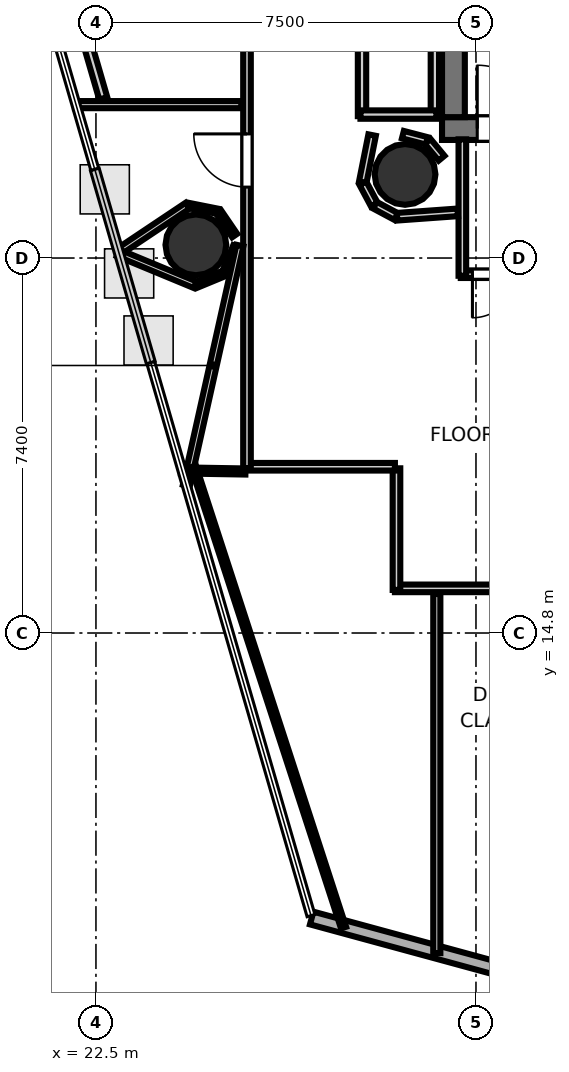
"""IFC4 building model, lengths in metres.
Left out: names, types, materials, properties, quantities, classifications, styles, units other than length and angle.
Written with IfcOpenShell. Run it as: python <this file> out.ifc"""

import sys

from ifc_helpers import new_model, si_unit, direction, frame, frame_2d, origin, origin_2d, place, context, subcontext, project, spatial, rectangle, hollow_circle, extrude, element, fill, save


model = new_model("IFC4")
c1 = context("Model", 3, precision=1e-05, world=origin(), true_north=direction((0.0, 1.0)))
c2 = subcontext(c1, "Body", "Model", "MODEL_VIEW")
j1 = project(units=[si_unit("LENGTHUNIT", "METRE"), si_unit("PLANEANGLEUNIT", "RADIAN")], contexts=[c1])
p1 = place(None, origin())
s1 = spatial("IfcSite", under=j1, at=p1, CompositionType="ELEMENT")
p2 = place(p1, origin())
s2 = spatial("IfcBuilding", under=s1, at=p2, CompositionType="ELEMENT")
p3 = place(p2, frame((0.0, 0.0, 215.1)))
s3 = spatial("IfcBuildingStorey", under=s2, at=p3, CompositionType="ELEMENT", Elevation=215.1)
p4 = place(p3, frame((29.33, 24.755, 0.0), z_axis=(0.0, 0.0, 1.0), x_axis=(1.0, 0.0, 0.0)))
e1 = element("IfcWall", 1, at=p4, inside=s3, PredefinedType="SHEAR", context=c2, shape_type="SweptSolid", body=[
    extrude(rectangle(XDim=10.52, YDim=0.45, at=frame_2d((5.26, 0.0))), origin(), (0.0, 0.0, 1.0), 3.52),
])
p5 = place(p4, frame((0.695, 0.0, 0.0)))
e2 = element("IfcOpeningElement", 2, at=p5, cuts=e1, PredefinedType="OPENING", context=c2, shape_type="SweptSolid", body=[
    extrude(rectangle(XDim=1.25, YDim=2.15, at=frame_2d((0.625, 1.075))), frame((0.0, 0.235, 0.0), z_axis=(0.0, -1.0, 0.0), x_axis=(1.0, 0.0, 0.0)), (0.0, 0.0, 1.0), 0.47),
])
p6 = place(p3, frame((29.555, 24.98, 0.0), z_axis=(0.0, 0.0, 1.0), x_axis=(0.0, 1.0, 0.0)))
e3 = element("IfcWall", 3, at=p6, inside=s3, PredefinedType="SHEAR", context=c2, shape_type="SweptSolid", body=[
    extrude(rectangle(XDim=7.44, YDim=0.45, at=frame_2d((3.72, 0.0))), origin(), (0.0, 0.0, 1.0), 3.52),
])
for number, where, z_axis, x_axis in (
    (4, (28.6, 23.85, 0.0), (0.0, 0.0, 1.0), (1.0, 0.0, 0.0)),
    (5, (24.472, 22.46, 0.0), (0.0, 0.0, 1.0), (1.0, 0.0, 0.0)),
):
    element("IfcColumn", number, at=place(p3, frame(where, z_axis=z_axis, x_axis=x_axis)), inside=s3, PredefinedType="COLUMN", context=c2, shape_type="SweptSolid", body=[
        extrude(hollow_circle(Radius=0.6, WallThickness=0.03, at=origin_2d()), origin(), (0.0, 0.0, 1.0), 3.7),
    ])
p7 = place(p3, frame((26.758, 9.175, 0.0), z_axis=(0.0, 0.0, 1.0), x_axis=(0.964898373598, -0.262623549265, 0.0)))
e6 = element("IfcWall", 6, at=p7, inside=s3, PredefinedType="SOLIDWALL", context=c2, shape_type="SweptSolid", body=[
    extrude(rectangle(XDim=7.028, YDim=0.26, at=frame_2d((3.514, 0.0))), origin(), (0.0, 0.0, 1.0), 3.52),
])
p8 = place(p7, frame((4.32, 0.0, 0.9)))
e7 = element("IfcOpeningElement", 7, at=p8, cuts=e6, PredefinedType="OPENING", context=c2, shape_type="SweptSolid", body=[
    extrude(rectangle(XDim=1.2, YDim=2.0, at=frame_2d((0.6, 1.0))), frame((0.0, 0.14, 0.0), z_axis=(0.0, -1.0, 0.0), x_axis=(1.0, 0.0, 0.0)), (0.0, 0.0, 1.0), 0.28),
])
p9 = place(p3, frame((33.45, 21.881, 0.0), z_axis=(0.0, 0.0, 1.0), x_axis=(-1.0, 0.0, 0.0)))
e8 = element("IfcWall", 8, at=p9, inside=s3, PredefinedType="PARTITIONING", context=c2, shape_type="SweptSolid", body=[
    extrude(rectangle(XDim=3.75, YDim=0.15, at=frame_2d((1.875, 0.0))), origin(), (0.0, 0.0, 1.0), 2.84),
])
p10 = place(p9, frame((1.275, 0.0, 0.0)))
e9 = element("IfcOpeningElement", 9, at=p10, cuts=e8, PredefinedType="OPENING", context=c2, shape_type="SweptSolid", body=[
    extrude(rectangle(XDim=1.2, YDim=2.15, at=frame_2d((0.6, 1.075))), frame((0.0, 0.085, 0.0), z_axis=(0.0, -1.0, 0.0), x_axis=(1.0, 0.0, 0.0)), (0.0, 0.0, 1.0), 0.17),
])
p11 = place(p9, frame((2.66, 0.0, 0.0)))
e10 = element("IfcOpeningElement", 10, at=p11, cuts=e8, PredefinedType="OPENING", context=c2, shape_type="SweptSolid", body=[
    extrude(rectangle(XDim=0.86, YDim=2.05, at=frame_2d((0.43, 1.025))), frame((0.0, 0.085, 0.0), z_axis=(0.0, -1.0, 0.0), x_axis=(1.0, 0.0, 0.0)), (0.0, 0.0, 1.0), 0.17),
])
p12 = place(p3, frame((29.731, 21.85, 0.0), z_axis=(0.0, 0.0, 1.0), x_axis=(0.0, 1.0, 0.0)))
e11 = element("IfcWall", 11, at=p12, inside=s3, PredefinedType="PARTITIONING", context=c2, shape_type="SweptSolid", body=[
    extrude(rectangle(XDim=2.692, YDim=0.15, at=frame_2d((1.346, 0.0))), origin(), (0.0, 0.0, 1.0), 2.84),
])
p13 = place(p3, frame((27.751, 25.0, 0.0), z_axis=(0.0, 0.0, 1.0), x_axis=(0.0, 1.0, 0.0)))
e12 = element("IfcWall", 12, at=p13, inside=s3, PredefinedType="PLUMBINGWALL", context=c2, shape_type="SweptSolid", body=[
    extrude(rectangle(XDim=4.12, YDim=0.165, at=frame_2d((2.06, 0.0))), origin(), (0.0, 0.0, 1.0), 2.84),
])
p14 = place(p13, frame((1.61, 0.0, 0.0)))
e13 = element("IfcOpeningElement", 13, at=p14, cuts=e12, PredefinedType="OPENING", context=c2, shape_type="SweptSolid", body=[
    extrude(rectangle(XDim=0.9, YDim=2.1, at=frame_2d((0.45, 1.05))), frame((0.0, 0.093, 0.0), z_axis=(0.0, -1.0, 0.0), x_axis=(1.0, 0.0, 0.0)), (0.0, 0.0, 1.0), 0.185),
])
p15 = place(p3, frame((29.189, 29.12, 0.0), z_axis=(0.0, 0.0, 1.0), x_axis=(0.0, -1.0, 0.0)))
e14 = element("IfcWall", 14, at=p15, inside=s3, PredefinedType="PLUMBINGWALL", context=c2, shape_type="SweptSolid", body=[
    extrude(rectangle(XDim=4.12, YDim=0.165, at=frame_2d((2.06, 0.0))), origin(), (0.0, 0.0, 1.0), 2.84),
])
p16 = place(p3, frame((29.22, 25.031, 0.0), z_axis=(0.0, 0.0, 1.0), x_axis=(-1.0, 0.0, 0.0)))
e15 = element("IfcWall", 15, at=p16, inside=s3, PredefinedType="PLUMBINGWALL", context=c2, shape_type="SweptSolid", body=[
    extrude(rectangle(XDim=1.5, YDim=0.165, at=frame_2d((0.75, 0.0))), origin(), (0.0, 0.0, 1.0), 2.84),
])
p17 = place(p3, frame((29.321, 24.17, 0.0), z_axis=(0.0, 0.0, 1.0), x_axis=(-0.638008265708, 0.770029514296, 0.0)))
e16 = element("IfcWall", 16, at=p17, inside=s3, PredefinedType="PARTITIONING", context=c2, shape_type="SweptSolid", body=[
    extrude(rectangle(XDim=0.431, YDim=0.15, at=frame_2d((0.215, 0.0))), origin(), (0.0, 0.0, 1.0), 2.84),
])
p18 = place(p3, frame((29.03, 24.512, 0.0), z_axis=(0.0, 0.0, 1.0), x_axis=(-0.967681003213, 0.252177469296, 0.0)))
e17 = element("IfcWall", 17, at=p18, inside=s3, PredefinedType="PARTITIONING", context=c2, shape_type="SweptSolid", body=[
    extrude(rectangle(XDim=0.488, YDim=0.15, at=frame_2d((0.244, 0.0))), origin(), (0.0, 0.0, 1.0), 2.84),
])
p19 = place(p3, frame((27.95, 24.626, 0.0), z_axis=(0.0, 0.0, 1.0), x_axis=(-0.195125950178, -0.980778192848, 0.0)))
e18 = element("IfcWall", 18, at=p19, inside=s3, PredefinedType="PARTITIONING", context=c2, shape_type="SweptSolid", body=[
    extrude(rectangle(XDim=0.948, YDim=0.15, at=frame_2d((0.474, 0.0))), origin(), (0.0, 0.0, 1.0), 2.84),
])
for number, where, z_axis, x_axis in (
    (19, (27.768, 23.675, 0.0), (0.0, 0.0, 1.0), (0.472, -0.882, 0.0)),
    (20, (28.006, 23.243, 0.0), (0.0, 0.0, 1.0), (0.882, -0.472, 0.0)),
):
    element("IfcWall", number, at=place(p3, frame(where, z_axis=z_axis, x_axis=x_axis)), inside=s3, PredefinedType="PARTITIONING", context=c2, shape_type="SweptSolid", body=[
        extrude(rectangle(XDim=0.476, YDim=0.15, at=frame_2d((0.238, 0.0))), origin(), (0.0, 0.0, 1.0), 2.84),
    ])
p20 = place(p3, frame((28.442, 23.015, 0.0), z_axis=(0.0, 0.0, 1.0), x_axis=(0.99740683837, 0.07196942943, 0.0)))
e21 = element("IfcWall", 21, at=p20, inside=s3, PredefinedType="PARTITIONING", context=c2, shape_type="SweptSolid", body=[
    extrude(rectangle(XDim=1.201, YDim=0.15, at=frame_2d((0.601, 0.0))), origin(), (0.0, 0.0, 1.0), 2.84),
])
p21 = place(p3, frame((43.333, 15.681, 0.0), z_axis=(0.0, 0.0, 1.0), x_axis=(-1.0, 0.0, 0.0)))
e22 = element("IfcWall", 22, at=p21, inside=s3, PredefinedType="PARTITIONING", context=c2, shape_type="SweptSolid", body=[
    extrude(rectangle(XDim=14.933, YDim=0.15, at=frame_2d((7.467, 0.0))), origin(), (0.0, 0.0, 1.0), 2.84),
])
p22 = place(p21, frame((6.846, 0.0, 0.0)))
e23 = element("IfcOpeningElement", 23, at=p22, cuts=e22, PredefinedType="OPENING", context=c2, shape_type="SweptSolid", body=[
    extrude(rectangle(XDim=1.25, YDim=2.2, at=frame_2d((0.625, 1.1))), frame((0.0, 0.085, 0.0), z_axis=(0.0, -1.0, 0.0), x_axis=(1.0, 0.0, 0.0)), (0.0, 0.0, 1.0), 0.17),
])
p23 = place(p3, frame((28.431, 15.65, 0.0), z_axis=(0.0, 0.0, 1.0), x_axis=(0.0, 1.0, 0.0)))
e24 = element("IfcWall", 24, at=p23, inside=s3, PredefinedType="PARTITIONING", context=c2, shape_type="SweptSolid", body=[
    extrude(rectangle(XDim=2.4, YDim=0.15, at=frame_2d((1.2, 0.0))), origin(), (0.0, 0.0, 1.0), 2.84),
])
p24 = place(p3, frame((28.4, 18.081, 0.0), z_axis=(0.0, 0.0, 1.0), x_axis=(-1.0, 0.0, 0.0)))
e25 = element("IfcWall", 25, at=p24, inside=s3, PredefinedType="PARTITIONING", context=c2, shape_type="SweptSolid", body=[
    extrude(rectangle(XDim=2.95, YDim=0.15, at=frame_2d((1.475, 0.0))), origin(), (0.0, 0.0, 1.0), 2.84),
])
p25 = place(p3, frame((25.481, 18.05, 0.0), z_axis=(0.0, 0.0, 1.0), x_axis=(0.0, 1.0, 0.0)))
e26 = element("IfcWall", 26, at=p25, inside=s3, PredefinedType="PARTITIONING", context=c2, shape_type="SweptSolid", body=[
    extrude(rectangle(XDim=18.219, YDim=0.15, at=frame_2d((9.109, 0.0))), origin(), (0.0, 0.0, 1.0), 2.84),
])
p26 = place(p25, frame((5.549, 0.0, 0.0)))
e27 = element("IfcOpeningElement", 27, at=p26, cuts=e26, PredefinedType="OPENING", context=c2, shape_type="SweptSolid", body=[
    extrude(rectangle(XDim=1.05, YDim=2.15, at=frame_2d((0.525, 1.075))), frame((0.0, 0.085, 0.0), z_axis=(0.0, -1.0, 0.0), x_axis=(1.0, 0.0, 0.0)), (0.0, 0.0, 1.0), 0.17),
])
p27 = place(p25, frame((15.285, 0.0, 0.0)))
e28 = element("IfcOpeningElement", 28, at=p27, cuts=e26, PredefinedType="OPENING", context=c2, shape_type="SweptSolid", body=[
    extrude(rectangle(XDim=0.9, YDim=2.1, at=frame_2d((0.45, 1.05))), frame((0.0, 0.085, 0.0), z_axis=(0.0, -1.0, 0.0), x_axis=(1.0, 0.0, 0.0)), (0.0, 0.0, 1.0), 0.17),
])
p28 = place(p25, frame((10.15, 0.0, 0.0)))
e29 = element("IfcOpeningElement", 29, at=p28, cuts=e26, PredefinedType="OPENING", context=c2, shape_type="SweptSolid", body=[
    extrude(rectangle(XDim=0.9, YDim=2.1, at=frame_2d((0.45, 1.05))), frame((0.0, 0.085, 0.0), z_axis=(0.0, -1.0, 0.0), x_axis=(1.0, 0.0, 0.0)), (0.0, 0.0, 1.0), 0.17),
])
p29 = place(p3, frame((25.238, 22.644, 0.0), z_axis=(0.0, 0.0, 1.0), x_axis=(-0.563363697458, 0.826209019792, 0.0)))
e30 = element("IfcWall", 30, at=p29, inside=s3, PredefinedType="PARTITIONING", context=c2, shape_type="SweptSolid", body=[
    extrude(rectangle(XDim=0.564, YDim=0.12, at=frame_2d((0.282, 0.0))), origin(), (0.0, 0.0, 1.0), 2.84),
])
p30 = place(p3, frame((24.9, 23.122, 0.0), z_axis=(0.0, 0.0, 1.0), x_axis=(-0.980773892286, 0.195147565217, 0.0)))
e31 = element("IfcWall", 31, at=p30, inside=s3, PredefinedType="PARTITIONING", context=c2, shape_type="SweptSolid", body=[
    extrude(rectangle(XDim=0.582, YDim=0.105, at=frame_2d((0.291, 0.0))), origin(), (0.0, 0.0, 1.0), 2.84),
])
p31 = place(p3, frame((24.306, 23.231, 0.0), z_axis=(0.0, 0.0, 1.0), x_axis=(-0.83134563291, -0.555755736489, 0.0)))
e32 = element("IfcWall", 32, at=p31, inside=s3, PredefinedType="PARTITIONING", context=c2, shape_type="SweptSolid", body=[
    extrude(rectangle(XDim=1.654, YDim=0.14, at=frame_2d((0.827, 0.0))), origin(), (0.0, 0.0, 1.0), 2.84),
])
p32 = place(p3, frame((22.938, 22.302, 0.0), z_axis=(0.0, 0.0, 1.0), x_axis=(0.923859705961, -0.382731294386, 0.0)))
e33 = element("IfcWall", 33, at=p32, inside=s3, PredefinedType="PARTITIONING", context=c2, shape_type="SweptSolid", body=[
    extrude(rectangle(XDim=1.648, YDim=0.14, at=frame_2d((0.824, 0.0))), origin(), (0.0, 0.0, 1.0), 2.84),
])
p33 = place(p3, frame((24.484, 21.671, 0.0), z_axis=(0.0, 0.0, 1.0), x_axis=(0.923832639322, 0.382796622927, 0.0)))
e34 = element("IfcWall", 34, at=p33, inside=s3, PredefinedType="PARTITIONING", context=c2, shape_type="SweptSolid", body=[
    extrude(rectangle(XDim=0.582, YDim=0.12, at=frame_2d((0.291, 0.0))), origin(), (0.0, 0.0, 1.0), 2.84),
])
p34 = place(p3, frame((25.038, 21.91, 0.0), z_axis=(0.0, 0.0, 1.0), x_axis=(0.389093528864, 0.921198255424, 0.0)))
e35 = element("IfcWall", 35, at=p34, inside=s3, PredefinedType="PARTITIONING", context=c2, shape_type="SweptSolid", body=[
    extrude(rectangle(XDim=0.568, YDim=0.105, at=frame_2d((0.284, 0.0))), origin(), (0.0, 0.0, 1.0), 2.84),
])
p35 = place(p3, frame((25.341, 22.446, 0.0), z_axis=(0.0, 0.0, 1.0), x_axis=(-0.217921517361, -0.975966296688, 0.0)))
e36 = element("IfcWall", 36, at=p35, inside=s3, PredefinedType="PARTITIONING", context=c2, shape_type="SweptSolid", body=[
    extrude(rectangle(XDim=4.851, YDim=0.14, at=frame_2d((2.426, 0.0))), origin(), (0.0, 0.0, 1.0), 2.84),
])
p36 = place(p3, frame((24.178, 18.009, 0.0), z_axis=(0.0, 0.0, 1.0), x_axis=(0.999860499529, -0.016702738759, 0.0)))
e37 = element("IfcWall", 37, at=p36, inside=s3, PredefinedType="PARTITIONING", context=c2, shape_type="SweptSolid", body=[
    extrude(rectangle(XDim=1.272, YDim=0.12, at=frame_2d((0.636, 0.0))), origin(), (0.0, 0.0, 1.0), 2.84),
])
p37 = place(p3, frame((29.227, 15.57, 0.0), z_axis=(0.0, 0.0, 1.0), x_axis=(0.0, -1.0, 0.0)))
e38 = element("IfcWall", 38, at=p37, inside=s3, PredefinedType="PARTITIONING", context=c2, shape_type="SweptSolid", body=[
    extrude(rectangle(XDim=7.087, YDim=0.14, at=frame_2d((3.543, 0.0))), origin(), (0.0, 0.0, 1.0), 2.84),
])
p38 = place(p3, frame((27.386, 8.987, 0.0), z_axis=(0.0, 0.0, 1.0), x_axis=(-0.309377923312, 0.950939167648, 0.0)))
e39 = element("IfcWall", 39, at=p38, inside=s3, PredefinedType="PARTITIONING", context=c2, shape_type="SweptSolid", body=[
    extrude(rectangle(XDim=9.571, YDim=0.105, at=frame_2d((4.785, 0.0))), origin(), (0.0, 0.0, 1.0), 2.84),
])
p39 = place(p3, frame((22.086, 25.227, 0.0), z_axis=(0.0, 0.0, 1.0), x_axis=(1.0, 0.0, 0.0)))
e40 = element("IfcWall", 40, at=p39, inside=s3, PredefinedType="PARTITIONING", context=c2, shape_type="SweptSolid", body=[
    extrude(rectangle(XDim=3.284, YDim=0.14, at=frame_2d((1.642, 0.0))), origin(), (0.0, 0.0, 1.0), 2.84),
])
p40 = place(p3, frame((22.644, 25.351, 0.0), z_axis=(0.0, 0.0, 1.0), x_axis=(-0.278305064514, 0.960492733479, 0.0)))
e41 = element("IfcWall", 41, at=p40, inside=s3, PredefinedType="PLUMBINGWALL", context=c2, shape_type="SweptSolid", body=[
    extrude(rectangle(XDim=6.888, YDim=0.165, at=frame_2d((3.444, 0.0))), origin(), (0.0, 0.0, 1.0), 2.84),
])
p41 = place(p5, origin())
e42 = element("IfcDoor", 42, at=p41, inside=s3, OperationType="SINGLE_SWING_LEFT", PredefinedType="DOOR", context=c2, shape_type="SweptSolid", body=[
    extrude(rectangle(XDim=1.25, YDim=2.15, at=frame_2d((0.625, 1.075))), frame((0.0, 0.025, 0.0), z_axis=(0.0, -1.0, 0.0), x_axis=(1.0, 0.0, 0.0)), (0.0, 0.0, 1.0), 0.05),
])
fill(e2, e42)
p42 = place(p11, origin())
e43 = element("IfcDoor", 43, at=p42, inside=s3, OperationType="SINGLE_SWING_RIGHT", PredefinedType="DOOR", context=c2, shape_type="SweptSolid", body=[
    extrude(rectangle(XDim=0.86, YDim=2.05, at=frame_2d((0.43, 1.025))), frame((0.0, 0.025, 0.0), z_axis=(0.0, -1.0, 0.0), x_axis=(1.0, 0.0, 0.0)), (0.0, 0.0, 1.0), 0.05),
])
fill(e10, e43)
p43 = place(p26, origin())
e44 = element("IfcDoor", 44, at=p43, inside=s3, OperationType="SINGLE_SWING_RIGHT", PredefinedType="DOOR", context=c2, shape_type="SweptSolid", body=[
    extrude(rectangle(XDim=1.05, YDim=2.15, at=frame_2d((0.525, 1.075))), frame((0.0, 0.025, 0.0), z_axis=(0.0, -1.0, 0.0), x_axis=(1.0, 0.0, 0.0)), (0.0, 0.0, 1.0), 0.05),
])
fill(e27, e44)
save(model, sys.argv[1])
